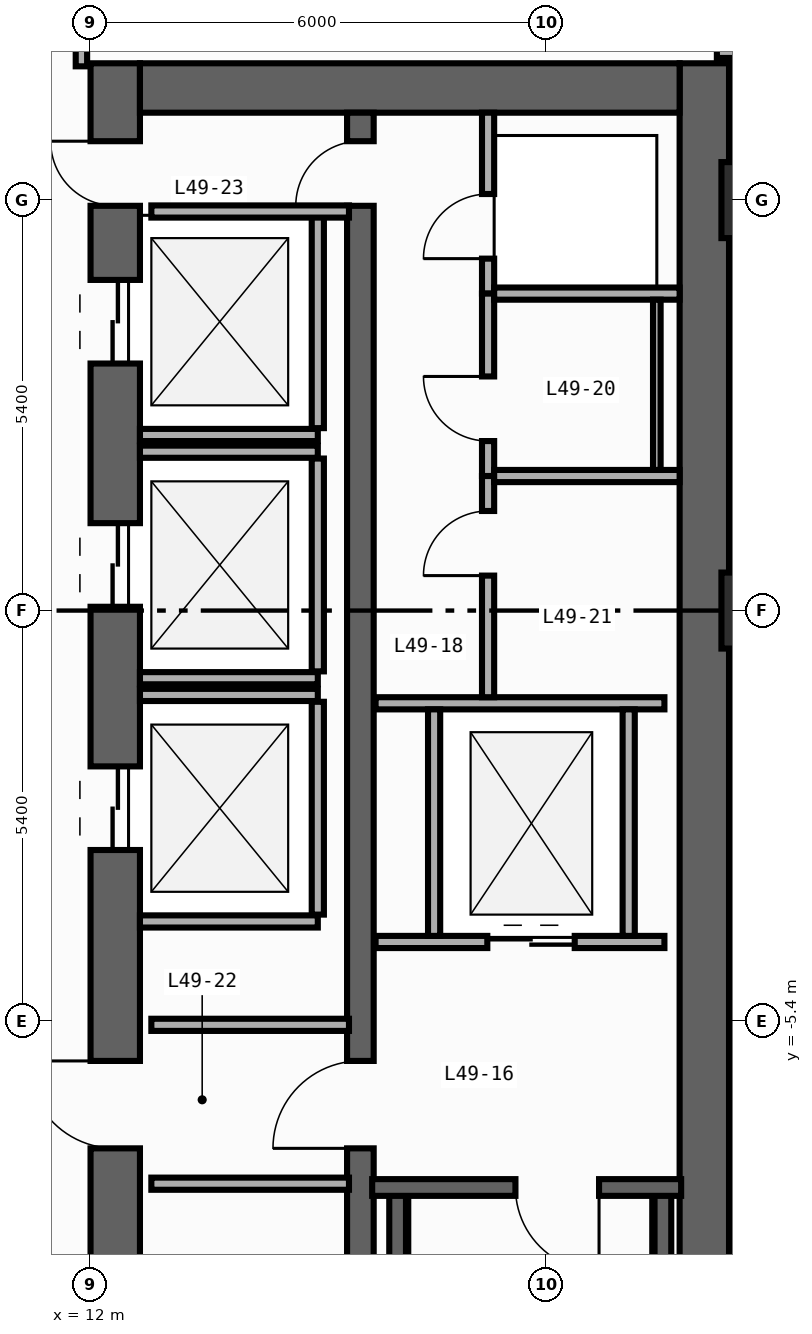
"""IFC4 building model, lengths in metres.
Left out: names, types, materials, properties, quantities, classifications, styles, units other than length and angle.
Written with IfcOpenShell. Run it as: python <this file> out.ifc"""

import sys

from ifc_helpers import new_model, si_unit, direction, frame, frame_2d, origin, origin_2d, place, context, subcontext, project, spatial, rectangle, extrude, element, fill, save


model = new_model("IFC4")
c1 = context("Model", 3, precision=1e-05, world=origin(), true_north=direction((0.0, 1.0)))
c2 = subcontext(c1, "Body", "Model", "MODEL_VIEW")
j1 = project(units=[si_unit("LENGTHUNIT", "METRE"), si_unit("PLANEANGLEUNIT", "RADIAN")], contexts=[c1])
p1 = place(None, origin())
s1 = spatial("IfcSite", under=j1, at=p1, CompositionType="ELEMENT")
p2 = place(p1, origin())
s2 = spatial("IfcBuilding", under=s1, at=p2, CompositionType="ELEMENT")
p3 = place(p2, frame((0.0, 0.0, 210.6)))
s3 = spatial("IfcBuildingStorey", under=s2, at=p3, CompositionType="ELEMENT", Elevation=210.6)
p4 = place(p3, frame((12.325, -19.8, 0.0), z_axis=(0.0, 0.0, 1.0), x_axis=(0.0, 1.0, 0.0)))
e1 = element("IfcWall", 1, at=p4, inside=s3, PredefinedType="SHEAR", context=c2, shape_type="SweptSolid", body=[
    extrude(rectangle(XDim=27.0, YDim=0.65, at=frame_2d((13.5, 0.0))), origin(), (0.0, 0.0, 1.0), 3.45),
])
p5 = place(p4, frame((23.05, 0.0, 0.0)))
e2 = element("IfcOpeningElement", 2, at=p5, cuts=e1, PredefinedType="OPENING", context=c2, shape_type="SweptSolid", body=[
    extrude(rectangle(XDim=1.1, YDim=2.2, at=frame_2d((0.55, 1.1))), frame((0.0, 0.335, 0.0), z_axis=(0.0, -1.0, 0.0), x_axis=(1.0, 0.0, 0.0)), (0.0, 0.0, 1.0), 0.67),
])
p6 = place(p4, frame((19.85, 0.0, 0.0)))
e3 = element("IfcOpeningElement", 3, at=p6, cuts=e1, PredefinedType="OPENING", context=c2, shape_type="SweptSolid", body=[
    extrude(rectangle(XDim=1.1, YDim=2.2, at=frame_2d((0.55, 1.1))), frame((0.0, 0.335, 0.0), z_axis=(0.0, -1.0, 0.0), x_axis=(1.0, 0.0, 0.0)), (0.0, 0.0, 1.0), 0.67),
])
p7 = place(p4, frame((16.65, 0.0, 0.0)))
e4 = element("IfcOpeningElement", 4, at=p7, cuts=e1, PredefinedType="OPENING", context=c2, shape_type="SweptSolid", body=[
    extrude(rectangle(XDim=1.1, YDim=2.2, at=frame_2d((0.55, 1.1))), frame((0.0, 0.335, 0.0), z_axis=(0.0, -1.0, 0.0), x_axis=(1.0, 0.0, 0.0)), (0.0, 0.0, 1.0), 0.67),
])
p8 = place(p4, frame((10.175, 0.0, 0.0)))
e5 = element("IfcOpeningElement", 5, at=p8, cuts=e1, PredefinedType="OPENING", context=c2, shape_type="SweptSolid", body=[
    extrude(rectangle(XDim=0.85, YDim=2.1, at=frame_2d((0.425, 1.05))), frame((0.0, 0.335, 0.0), z_axis=(0.0, -1.0, 0.0), x_axis=(1.0, 0.0, 0.0)), (0.0, 0.0, 1.0), 0.67),
])
p9 = place(p4, frame((12.725, 0.0, 0.0)))
e6 = element("IfcOpeningElement", 6, at=p9, cuts=e1, PredefinedType="OPENING", context=c2, shape_type="SweptSolid", body=[
    extrude(rectangle(XDim=1.15, YDim=2.2, at=frame_2d((0.575, 1.1))), frame((0.0, 0.335, 0.0), z_axis=(0.0, -1.0, 0.0), x_axis=(1.0, 0.0, 0.0)), (0.0, 0.0, 1.0), 0.67),
])
p10 = place(p4, frame((25.125, 0.0, 0.0)))
e7 = element("IfcOpeningElement", 7, at=p10, cuts=e1, PredefinedType="OPENING", context=c2, shape_type="SweptSolid", body=[
    extrude(rectangle(XDim=0.85, YDim=2.1, at=frame_2d((0.425, 1.05))), frame((0.0, 0.335, 0.0), z_axis=(0.0, -1.0, 0.0), x_axis=(1.0, 0.0, 0.0)), (0.0, 0.0, 1.0), 0.67),
])
p11 = place(p3, frame((20.075, -19.8, 0.0), z_axis=(0.0, 0.0, 1.0), x_axis=(0.0, 1.0, 0.0)))
e8 = element("IfcWall", 8, at=p11, inside=s3, PredefinedType="SHEAR", context=c2, shape_type="SweptSolid", body=[
    extrude(rectangle(XDim=27.0, YDim=0.65, at=frame_2d((13.5, 0.0))), origin(), (0.0, 0.0, 1.0), 3.45),
])
p12 = place(p3, frame((12.65, 6.875, 0.0), z_axis=(0.0, 0.0, 1.0), x_axis=(1.0, 0.0, 0.0)))
e9 = element("IfcWall", 9, at=p12, inside=s3, PredefinedType="SHEAR", context=c2, shape_type="SweptSolid", body=[
    extrude(rectangle(XDim=7.1, YDim=0.65, at=frame_2d((3.55, 0.0))), origin(), (0.0, 0.0, 1.0), 3.45),
])
p13 = place(p3, frame((15.55, -19.15, 0.0), z_axis=(0.0, 0.0, 1.0), x_axis=(0.0, 1.0, 0.0)))
e10 = element("IfcWall", 10, at=p13, inside=s3, PredefinedType="SHEAR", context=c2, shape_type="SweptSolid", body=[
    extrude(rectangle(XDim=25.7, YDim=0.35, at=frame_2d((12.85, 0.0))), origin(), (0.0, 0.0, 1.0), 3.45),
])
p14 = place(p13, frame((12.075, 0.0, 0.0)))
e11 = element("IfcOpeningElement", 11, at=p14, cuts=e10, PredefinedType="OPENING", context=c2, shape_type="SweptSolid", body=[
    extrude(rectangle(XDim=1.15, YDim=2.2, at=frame_2d((0.575, 1.1))), frame((0.0, 0.185, 0.0), z_axis=(0.0, -1.0, 0.0), x_axis=(1.0, 0.0, 0.0)), (0.0, 0.0, 1.0), 0.37),
])
p15 = place(p13, frame((24.475, 0.0, 0.0)))
e12 = element("IfcOpeningElement", 12, at=p15, cuts=e10, PredefinedType="OPENING", context=c2, shape_type="SweptSolid", body=[
    extrude(rectangle(XDim=0.85, YDim=2.1, at=frame_2d((0.425, 1.05))), frame((0.0, 0.185, 0.0), z_axis=(0.0, -1.0, 0.0), x_axis=(1.0, 0.0, 0.0)), (0.0, 0.0, 1.0), 0.37),
])
for number, where, z_axis, x_axis in (
    (13, (16.04, -19.01, 0.0), (0.0, 0.0, 1.0), (0.0, 1.0, 0.0)),
    (14, (19.53, -19.01, 0.0), (0.0, 0.0, 1.0), (0.0, 1.0, 0.0)),
):
    element("IfcWall", number, at=place(p3, frame(where, z_axis=z_axis, x_axis=x_axis)), inside=s3, PredefinedType="SHEAR", context=c2, shape_type="SweptSolid", body=[
        extrude(rectangle(XDim=11.42, YDim=0.22, at=frame_2d((5.71, 0.0))), origin(), (0.0, 0.0, 1.0), 3.45),
    ])
p16 = place(p3, frame((19.77, -7.59, 0.0), z_axis=(0.0, 0.0, 1.0), x_axis=(-1.0, 0.0, 0.0)))
e15 = element("IfcWall", 15, at=p16, inside=s3, PredefinedType="SHEAR", context=c2, shape_type="SweptSolid", body=[
    extrude(rectangle(XDim=4.065, YDim=0.22, at=frame_2d((2.032, 0.0))), origin(), (0.0, 0.0, 1.0), 3.45),
])
p17 = place(p16, frame((1.08, 0.0, 0.0)))
e16 = element("IfcOpeningElement", 16, at=p17, cuts=e15, PredefinedType="OPENING", context=c2, shape_type="SweptSolid", body=[
    extrude(rectangle(XDim=1.1, YDim=2.2, at=frame_2d((0.55, 1.1))), frame((0.0, 0.12, 0.0), z_axis=(0.0, -1.0, 0.0), x_axis=(1.0, 0.0, 0.0)), (0.0, 0.0, 1.0), 0.24),
])
for number, where, z_axis, x_axis in (
    (17, (20.8, 0.0, 0.0), (0.0, 0.0, 1.0), (1.0, 0.0, 0.0)),
    (18, (20.8, 5.4, 0.0), (0.0, 0.0, 1.0), (1.0, 0.0, 0.0)),
):
    element("IfcColumn", number, at=place(p3, frame(where, z_axis=z_axis, x_axis=x_axis)), inside=s3, PredefinedType="COLUMN", context=c2, shape_type="SweptSolid", body=[
        extrude(rectangle(XDim=1.0, YDim=1.0, at=origin_2d()), origin(), (0.0, 0.0, 1.0), 3.8),
    ])
p18 = place(p3, frame((12.65, 2.31, 0.0), z_axis=(0.0, 0.0, 1.0), x_axis=(1.0, 0.0, 0.0)))
e19 = element("IfcWall", 19, at=p18, inside=s3, PredefinedType="STANDARD", context=c2, shape_type="SweptSolid", body=[
    extrude(rectangle(XDim=2.34, YDim=0.16, at=frame_2d((1.17, 0.0))), origin(), (0.0, 0.0, 1.0), 3.45),
])
p19 = place(p3, frame((14.99, 2.4, 0.0), z_axis=(0.0, 0.0, 1.0), x_axis=(0.0, 1.0, 0.0)))
e20 = element("IfcWall", 20, at=p19, inside=s3, PredefinedType="STANDARD", context=c2, shape_type="SweptSolid", body=[
    extrude(rectangle(XDim=2.8, YDim=0.16, at=frame_2d((1.4, 0.0))), origin(), (0.0, 0.0, 1.0), 3.45),
])
for number, where, z_axis, x_axis in (
    (21, (12.65, -0.89, 0.0), (0.0, 0.0, 1.0), (1.0, 0.0, 0.0)),
    (22, (12.65, 2.09, 0.0), (0.0, 0.0, 1.0), (1.0, 0.0, 0.0)),
):
    element("IfcWall", number, at=place(p3, frame(where, z_axis=z_axis, x_axis=x_axis)), inside=s3, PredefinedType="STANDARD", context=c2, shape_type="SweptSolid", body=[
        extrude(rectangle(XDim=2.34, YDim=0.16, at=frame_2d((1.17, 0.0))), origin(), (0.0, 0.0, 1.0), 3.45),
    ])
p20 = place(p3, frame((14.99, -0.8, 0.0), z_axis=(0.0, 0.0, 1.0), x_axis=(0.0, 1.0, 0.0)))
e23 = element("IfcWall", 23, at=p20, inside=s3, PredefinedType="STANDARD", context=c2, shape_type="SweptSolid", body=[
    extrude(rectangle(XDim=2.8, YDim=0.16, at=frame_2d((1.4, 0.0))), origin(), (0.0, 0.0, 1.0), 3.45),
])
for number, where, z_axis, x_axis in (
    (24, (12.65, -4.09, 0.0), (0.0, 0.0, 1.0), (1.0, 0.0, 0.0)),
    (25, (12.65, -1.11, 0.0), (0.0, 0.0, 1.0), (1.0, 0.0, 0.0)),
):
    element("IfcWall", number, at=place(p3, frame(where, z_axis=z_axis, x_axis=x_axis)), inside=s3, PredefinedType="STANDARD", context=c2, shape_type="SweptSolid", body=[
        extrude(rectangle(XDim=2.34, YDim=0.16, at=frame_2d((1.17, 0.0))), origin(), (0.0, 0.0, 1.0), 3.45),
    ])
p21 = place(p3, frame((14.99, -4.0, 0.0), z_axis=(0.0, 0.0, 1.0), x_axis=(0.0, 1.0, 0.0)))
e26 = element("IfcWall", 26, at=p21, inside=s3, PredefinedType="STANDARD", context=c2, shape_type="SweptSolid", body=[
    extrude(rectangle(XDim=2.8, YDim=0.16, at=frame_2d((1.4, 0.0))), origin(), (0.0, 0.0, 1.0), 3.45),
])
p22 = place(p3, frame((15.75, -4.36, 0.0), z_axis=(0.0, 0.0, 1.0), x_axis=(1.0, 0.0, 0.0)))
e27 = element("IfcWall", 27, at=p22, inside=s3, PredefinedType="STANDARD", context=c2, shape_type="SweptSolid", body=[
    extrude(rectangle(XDim=3.8, YDim=0.16, at=frame_2d((1.9, 0.0))), origin(), (0.0, 0.0, 1.0), 3.45),
])
p23 = place(p22, frame((1.47, 0.0, 0.0)))
e28 = element("IfcOpeningElement", 28, at=p23, cuts=e27, PredefinedType="OPENING", context=c2, shape_type="SweptSolid", body=[
    extrude(rectangle(XDim=1.15, YDim=2.2, at=frame_2d((0.575, 1.1))), frame((0.0, 0.09, 0.0), z_axis=(0.0, -1.0, 0.0), x_axis=(1.0, 0.0, 0.0)), (0.0, 0.0, 1.0), 0.18),
])
p24 = place(p3, frame((15.75, -1.22, 0.0), z_axis=(0.0, 0.0, 1.0), x_axis=(1.0, 0.0, 0.0)))
e29 = element("IfcWall", 29, at=p24, inside=s3, PredefinedType="STANDARD", context=c2, shape_type="SweptSolid", body=[
    extrude(rectangle(XDim=3.8, YDim=0.16, at=frame_2d((1.9, 0.0))), origin(), (0.0, 0.0, 1.0), 3.45),
])
for number, where, z_axis, x_axis in (
    (30, (16.52, -4.28, 0.0), (0.0, 0.0, 1.0), (0.0, 1.0, 0.0)),
    (31, (19.08, -4.28, 0.0), (0.0, 0.0, 1.0), (0.0, 1.0, 0.0)),
):
    element("IfcWall", number, at=place(p3, frame(where, z_axis=z_axis, x_axis=x_axis)), inside=s3, PredefinedType="STANDARD", context=c2, shape_type="SweptSolid", body=[
        extrude(rectangle(XDim=2.98, YDim=0.16, at=frame_2d((1.49, 0.0))), origin(), (0.0, 0.0, 1.0), 3.45),
    ])
for number, where, z_axis, x_axis in (
    (32, (12.8, -5.45, 0.0), (0.0, 0.0, 1.0), (1.0, 0.0, 0.0)),
    (33, (12.8, -7.54, 0.0), (0.0, 0.0, 1.0), (1.0, 0.0, 0.0)),
    (34, (12.8, 5.25, 0.0), (0.0, 0.0, 1.0), (1.0, 0.0, 0.0)),
):
    element("IfcWall", number, at=place(p3, frame(where, z_axis=z_axis, x_axis=x_axis)), inside=s3, PredefinedType="STANDARD", context=c2, shape_type="SweptSolid", body=[
        extrude(rectangle(XDim=2.6, YDim=0.16, at=frame_2d((1.3, 0.0))), origin(), (0.0, 0.0, 1.0), 3.45),
    ])
p25 = place(p3, frame((17.23, 4.17, 0.0), z_axis=(0.0, 0.0, 1.0), x_axis=(0.0, 1.0, 0.0)))
e35 = element("IfcWall", 35, at=p25, inside=s3, PredefinedType="PARTITIONING", context=c2, shape_type="SweptSolid", body=[
    extrude(rectangle(XDim=2.38, YDim=0.16, at=frame_2d((1.19, 0.0))), origin(), (0.0, 0.0, 1.0), 3.45),
])
p26 = place(p25, frame((0.46, 0.0, 0.0)))
e36 = element("IfcOpeningElement", 36, at=p26, cuts=e35, PredefinedType="OPENING", context=c2, shape_type="SweptSolid", body=[
    extrude(rectangle(XDim=0.85, YDim=2.1, at=frame_2d((0.425, 1.05))), frame((0.0, 0.09, 0.0), z_axis=(0.0, -1.0, 0.0), x_axis=(1.0, 0.0, 0.0)), (0.0, 0.0, 1.0), 0.18),
])
p27 = place(p3, frame((17.23, 1.77, 0.0), z_axis=(0.0, 0.0, 1.0), x_axis=(0.0, 1.0, 0.0)))
e37 = element("IfcWall", 37, at=p27, inside=s3, PredefinedType="PARTITIONING", context=c2, shape_type="SweptSolid", body=[
    extrude(rectangle(XDim=2.4, YDim=0.16, at=frame_2d((1.2, 0.0))), origin(), (0.0, 0.0, 1.0), 3.45),
])
p28 = place(p27, frame((0.46, 0.0, 0.0)))
e38 = element("IfcOpeningElement", 38, at=p28, cuts=e37, PredefinedType="OPENING", context=c2, shape_type="SweptSolid", body=[
    extrude(rectangle(XDim=0.85, YDim=2.1, at=frame_2d((0.425, 1.05))), frame((0.0, 0.09, 0.0), z_axis=(0.0, -1.0, 0.0), x_axis=(1.0, 0.0, 0.0)), (0.0, 0.0, 1.0), 0.18),
])
p29 = place(p3, frame((17.23, -1.14, 0.0), z_axis=(0.0, 0.0, 1.0), x_axis=(0.0, 1.0, 0.0)))
e39 = element("IfcWall", 39, at=p29, inside=s3, PredefinedType="PARTITIONING", context=c2, shape_type="SweptSolid", body=[
    extrude(rectangle(XDim=2.91, YDim=0.16, at=frame_2d((1.455, 0.0))), origin(), (0.0, 0.0, 1.0), 3.45),
])
p30 = place(p29, frame((1.6, 0.0, 0.0)))
e40 = element("IfcOpeningElement", 40, at=p30, cuts=e39, PredefinedType="OPENING", context=c2, shape_type="SweptSolid", body=[
    extrude(rectangle(XDim=0.85, YDim=2.1, at=frame_2d((0.425, 1.05))), frame((0.0, 0.09, 0.0), z_axis=(0.0, -1.0, 0.0), x_axis=(1.0, 0.0, 0.0)), (0.0, 0.0, 1.0), 0.18),
])
for number, where, z_axis, x_axis in (
    (41, (17.31, 4.17, 0.0), (0.0, 0.0, 1.0), (1.0, 0.0, 0.0)),
    (42, (17.31, 1.77, 0.0), (0.0, 0.0, 1.0), (1.0, 0.0, 0.0)),
):
    element("IfcWall", number, at=place(p3, frame(where, z_axis=z_axis, x_axis=x_axis)), inside=s3, PredefinedType="PARTITIONING", context=c2, shape_type="SweptSolid", body=[
        extrude(rectangle(XDim=2.44, YDim=0.16, at=frame_2d((1.22, 0.0))), origin(), (0.0, 0.0, 1.0), 3.45),
    ])
p31 = place(p3, frame((11.88, 7.16, 0.0), z_axis=(0.0, 0.0, 1.0), x_axis=(0.0, 1.0, 0.0)))
e43 = element("IfcWall", 43, at=p31, inside=s3, PredefinedType="PARTITIONING", context=c2, shape_type="SweptSolid", body=[
    extrude(rectangle(XDim=9.255, YDim=0.15, at=frame_2d((4.627, 0.0))), origin(), (0.0, 0.0, 1.0), 3.45),
])
p32 = place(p31, frame((0.46, 0.0, 0.0)))
e44 = element("IfcOpeningElement", 44, at=p32, cuts=e43, PredefinedType="OPENING", context=c2, shape_type="SweptSolid", body=[
    extrude(rectangle(XDim=0.9, YDim=2.15, at=frame_2d((0.45, 1.075))), frame((0.0, 0.085, 0.0), z_axis=(0.0, -1.0, 0.0), x_axis=(1.0, 0.0, 0.0)), (0.0, 0.0, 1.0), 0.17),
])
p33 = place(p3, frame((20.24, 7.34, 0.0), z_axis=(0.0, 0.0, 1.0), x_axis=(1.0, 0.0, 0.0)))
e45 = element("IfcWall", 45, at=p33, inside=s3, PredefinedType="PARTITIONING", context=c2, shape_type="SweptSolid", body=[
    extrude(rectangle(XDim=2.215, YDim=0.14, at=frame_2d((1.107, 0.0))), origin(), (0.0, 0.0, 1.0), 3.45),
])
p34 = place(p33, frame((0.905, 0.0, 0.0)))
e46 = element("IfcOpeningElement", 46, at=p34, cuts=e45, PredefinedType="OPENING", context=c2, shape_type="SweptSolid", body=[
    extrude(rectangle(XDim=0.85, YDim=2.1, at=frame_2d((0.425, 1.05))), frame((0.0, 0.08, 0.0), z_axis=(0.0, -1.0, 0.0), x_axis=(1.0, 0.0, 0.0)), (0.0, 0.0, 1.0), 0.16),
])
p35 = place(p3, frame((19.45, 4.09, 0.0), z_axis=(0.0, 0.0, 1.0), x_axis=(0.0, -1.0, 0.0)))
e47 = element("IfcWall", 47, at=p35, inside=s3, PredefinedType="PARTITIONING", context=c2, shape_type="SweptSolid", body=[
    extrude(rectangle(XDim=2.24, YDim=0.1, at=frame_2d((1.12, 0.0))), origin(), (0.0, 0.0, 1.0), 3.45),
])
p36 = place(p17, origin())
e48 = element("IfcDoor", 48, at=p36, inside=s3, OperationType="SINGLE_SWING_LEFT", PredefinedType="DOOR", context=c2, shape_type="SweptSolid", body=[
    extrude(rectangle(XDim=1.1, YDim=2.2, at=frame_2d((0.55, 1.1))), frame((0.0, 0.025, 0.0), z_axis=(0.0, -1.0, 0.0), x_axis=(1.0, 0.0, 0.0)), (0.0, 0.0, 1.0), 0.05),
])
fill(e16, e48)
p37 = place(p5, origin())
e49 = element("IfcDoor", 49, at=p37, inside=s3, OperationType="DOUBLE_DOOR_SLIDING", PredefinedType="DOOR", context=c2, shape_type="SweptSolid", body=[
    extrude(rectangle(XDim=1.1, YDim=2.2, at=frame_2d((0.55, 1.1))), frame((0.0, 0.025, 0.0), z_axis=(0.0, -1.0, 0.0), x_axis=(1.0, 0.0, 0.0)), (0.0, 0.0, 1.0), 0.05),
])
fill(e2, e49)
p38 = place(p6, origin())
e50 = element("IfcDoor", 50, at=p38, inside=s3, OperationType="DOUBLE_DOOR_SLIDING", PredefinedType="DOOR", context=c2, shape_type="SweptSolid", body=[
    extrude(rectangle(XDim=1.1, YDim=2.2, at=frame_2d((0.55, 1.1))), frame((0.0, 0.025, 0.0), z_axis=(0.0, -1.0, 0.0), x_axis=(1.0, 0.0, 0.0)), (0.0, 0.0, 1.0), 0.05),
])
fill(e3, e50)
p39 = place(p7, origin())
e51 = element("IfcDoor", 51, at=p39, inside=s3, OperationType="DOUBLE_DOOR_SLIDING", PredefinedType="DOOR", context=c2, shape_type="SweptSolid", body=[
    extrude(rectangle(XDim=1.1, YDim=2.2, at=frame_2d((0.55, 1.1))), frame((0.0, 0.025, 0.0), z_axis=(0.0, -1.0, 0.0), x_axis=(1.0, 0.0, 0.0)), (0.0, 0.0, 1.0), 0.05),
])
fill(e4, e51)
p40 = place(p9, origin())
e52 = element("IfcDoor", 52, at=p40, inside=s3, OperationType="SINGLE_SWING_RIGHT", PredefinedType="DOOR", context=c2, shape_type="SweptSolid", body=[
    extrude(rectangle(XDim=1.15, YDim=2.2, at=frame_2d((0.575, 1.1))), frame((0.0, 0.025, 0.0), z_axis=(0.0, -1.0, 0.0), x_axis=(1.0, 0.0, 0.0)), (0.0, 0.0, 1.0), 0.05),
])
fill(e6, e52)
p41 = place(p14, origin())
e53 = element("IfcDoor", 53, at=p41, inside=s3, OperationType="SINGLE_SWING_LEFT", PredefinedType="DOOR", context=c2, shape_type="SweptSolid", body=[
    extrude(rectangle(XDim=1.15, YDim=2.2, at=frame_2d((0.575, 1.1))), frame((0.0, 0.025, 0.0), z_axis=(0.0, -1.0, 0.0), x_axis=(1.0, 0.0, 0.0)), (0.0, 0.0, 1.0), 0.05),
])
fill(e11, e53)
p42 = place(p10, origin())
e54 = element("IfcDoor", 54, at=p42, inside=s3, OperationType="SINGLE_SWING_RIGHT", PredefinedType="DOOR", context=c2, shape_type="SweptSolid", body=[
    extrude(rectangle(XDim=0.85, YDim=2.1, at=frame_2d((0.425, 1.05))), frame((0.0, 0.025, 0.0), z_axis=(0.0, -1.0, 0.0), x_axis=(1.0, 0.0, 0.0)), (0.0, 0.0, 1.0), 0.05),
])
fill(e7, e54)
p43 = place(p15, origin())
e55 = element("IfcDoor", 55, at=p43, inside=s3, OperationType="SINGLE_SWING_LEFT", PredefinedType="DOOR", context=c2, shape_type="SweptSolid", body=[
    extrude(rectangle(XDim=0.85, YDim=2.1, at=frame_2d((0.425, 1.05))), frame((0.0, 0.025, 0.0), z_axis=(0.0, -1.0, 0.0), x_axis=(1.0, 0.0, 0.0)), (0.0, 0.0, 1.0), 0.05),
])
fill(e12, e55)
p44 = place(p23, origin())
e56 = element("IfcDoor", 56, at=p44, inside=s3, OperationType="DOUBLE_DOOR_SLIDING", PredefinedType="DOOR", context=c2, shape_type="SweptSolid", body=[
    extrude(rectangle(XDim=1.15, YDim=2.2, at=frame_2d((0.575, 1.1))), frame((0.0, 0.025, 0.0), z_axis=(0.0, -1.0, 0.0), x_axis=(1.0, 0.0, 0.0)), (0.0, 0.0, 1.0), 0.05),
])
fill(e28, e56)
p45 = place(p26, origin())
e57 = element("IfcDoor", 57, at=p45, inside=s3, OperationType="SINGLE_SWING_LEFT", PredefinedType="DOOR", context=c2, shape_type="SweptSolid", body=[
    extrude(rectangle(XDim=0.85, YDim=2.1, at=frame_2d((0.425, 1.05))), frame((0.0, 0.025, 0.0), z_axis=(0.0, -1.0, 0.0), x_axis=(1.0, 0.0, 0.0)), (0.0, 0.0, 1.0), 0.05),
])
fill(e36, e57)
p46 = place(p28, origin())
e58 = element("IfcDoor", 58, at=p46, inside=s3, OperationType="SINGLE_SWING_RIGHT", PredefinedType="DOOR", context=c2, shape_type="SweptSolid", body=[
    extrude(rectangle(XDim=0.85, YDim=2.1, at=frame_2d((0.425, 1.05))), frame((0.0, 0.025, 0.0), z_axis=(0.0, -1.0, 0.0), x_axis=(1.0, 0.0, 0.0)), (0.0, 0.0, 1.0), 0.05),
])
fill(e38, e58)
p47 = place(p30, origin())
e59 = element("IfcDoor", 59, at=p47, inside=s3, OperationType="SINGLE_SWING_LEFT", PredefinedType="DOOR", context=c2, shape_type="SweptSolid", body=[
    extrude(rectangle(XDim=0.85, YDim=2.1, at=frame_2d((0.425, 1.05))), frame((0.0, 0.025, 0.0), z_axis=(0.0, -1.0, 0.0), x_axis=(1.0, 0.0, 0.0)), (0.0, 0.0, 1.0), 0.05),
])
fill(e40, e59)
save(model, sys.argv[1])
